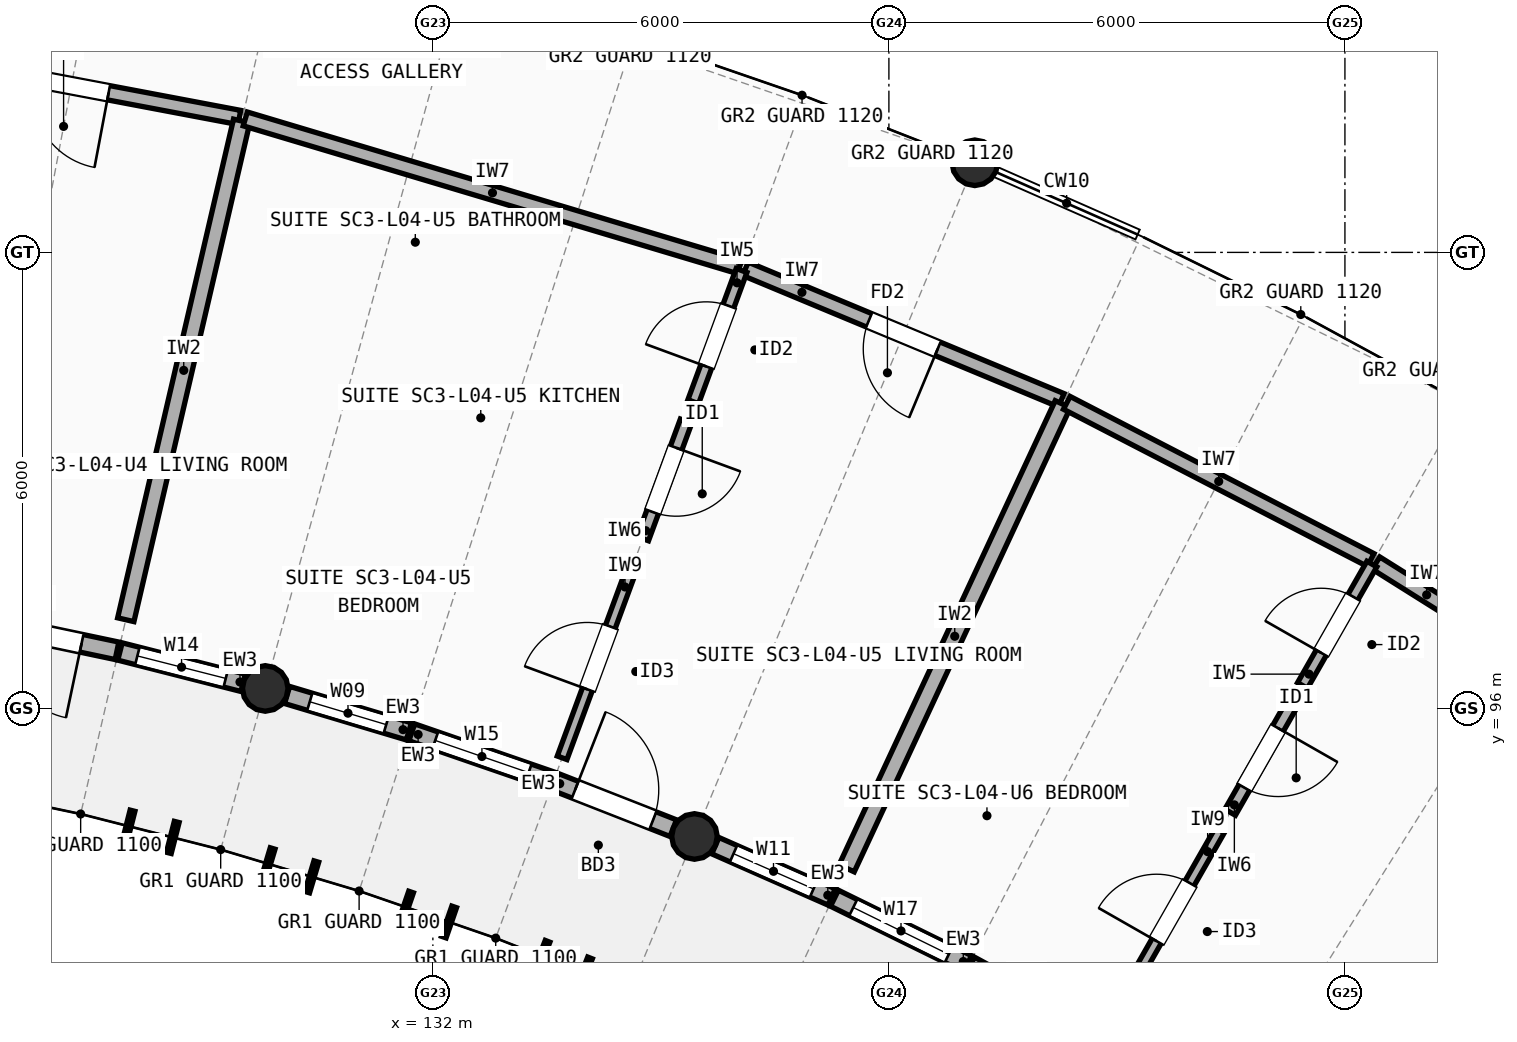
"""IFC4 building model, lengths in metres.
Left out: names, types, materials, properties, quantities, classifications, styles, units other than length and angle.
Written with IfcOpenShell. Run it as: python <this file> out.ifc"""

import sys

from ifc_helpers import new_model, si_unit, direction, frame, frame_2d, origin, origin_2d, place, context, subcontext, project, spatial, rectangle, circle, extrude, element, fill, save


model = new_model("IFC4")
c1 = context("Model", 3, precision=1e-05, world=origin(), true_north=direction((0.0, 1.0)))
c2 = subcontext(c1, "Body", "Model", "MODEL_VIEW")
j1 = project(units=[si_unit("LENGTHUNIT", "METRE"), si_unit("PLANEANGLEUNIT", "RADIAN")], contexts=[c1])
p1 = place(None, origin())
s1 = spatial("IfcSite", under=j1, at=p1, CompositionType="ELEMENT")
p2 = place(p1, origin())
s2 = spatial("IfcBuilding", under=s1, at=p2, CompositionType="ELEMENT")
p3 = place(p2, frame((0.0, 0.0, 14.1)))
s3 = spatial("IfcBuildingStorey", under=s2, at=p3, CompositionType="ELEMENT", Elevation=14.1)
for number, where, z_axis, x_axis in (
    (1, (129.795, 96.263, 0.0), (0.0, 0.0, 1.0), (1.0, 0.0, 0.0)),
    (2, (135.442, 94.316, 0.0), (0.0, 0.0, 1.0), (1.0, 0.0, 0.0)),
    (3, (139.13, 103.179, 0.0), (0.0, 0.0, 1.0), (1.0, 0.0, 0.0)),
):
    element("IfcColumn", number, at=place(p3, frame(where, z_axis=z_axis, x_axis=x_axis)), inside=s3, PredefinedType="COLUMN", context=c2, shape_type="SweptSolid", body=[
        extrude(circle(Radius=0.3, at=origin_2d()), origin(), (0.0, 0.0, 1.0), 2.948),
    ])
p4 = place(p3, frame((125.934, 97.161, 0.0), z_axis=(0.0, 0.0, 1.0), x_axis=(0.978533860292, -0.206086108851, 0.0)))
e4 = element("IfcWall", 4, at=p4, inside=s3, PredefinedType="STANDARD", context=c2, shape_type="SweptSolid", body=[
    extrude(rectangle(XDim=1.952, YDim=0.235, at=frame_2d((0.976, 0.0))), origin(), (0.0, 0.0, 1.0), 2.684),
])
p5 = place(p4, frame((0.476, 0.0, 0.0)))
e5 = element("IfcOpeningElement", 5, at=p5, cuts=e4, PredefinedType="OPENING", context=c2, shape_type="SweptSolid", body=[
    extrude(rectangle(XDim=1.0, YDim=2.15, at=frame_2d((0.5, 1.075))), frame((0.0, 0.127, 0.0), z_axis=(0.0, -1.0, 0.0), x_axis=(1.0, 0.0, 0.0)), (0.0, 0.0, 1.0), 0.255),
])
p6 = place(p3, frame((127.883, 96.75, 0.0), z_axis=(0.0, 0.0, 1.0), x_axis=(0.969120648535, -0.246587040581, 0.0)))
e6 = element("IfcWall", 6, at=p6, inside=s3, PredefinedType="STANDARD", context=c2, shape_type="SweptSolid", body=[
    extrude(rectangle(XDim=1.672, YDim=0.235, at=frame_2d((0.836, 0.0))), origin(), (0.0, 0.0, 1.0), 2.684),
])
p7 = place(p6, frame((0.236, 0.0, 0.85)))
e7 = element("IfcOpeningElement", 7, at=p7, cuts=e6, PredefinedType="OPENING", context=c2, shape_type="SweptSolid", body=[
    extrude(rectangle(XDim=1.2, YDim=1.5, at=frame_2d((0.6, 0.75))), frame((0.0, 0.127, 0.0), z_axis=(0.0, -1.0, 0.0), x_axis=(1.0, 0.0, 0.0)), (0.0, 0.0, 1.0), 0.255),
])
p8 = place(p3, frame((130.082, 96.177, 0.0), z_axis=(0.0, 0.0, 1.0), x_axis=(0.958063008465, -0.286557623894, 0.0)))
e8 = element("IfcWall", 8, at=p8, inside=s3, PredefinedType="STANDARD", context=c2, shape_type="SweptSolid", body=[
    extrude(rectangle(XDim=1.672, YDim=0.235, at=frame_2d((0.836, 0.0))), origin(), (0.0, 0.0, 1.0), 2.684),
])
p9 = place(p8, frame((0.311, 0.0, 0.85)))
e9 = element("IfcOpeningElement", 9, at=p9, cuts=e8, PredefinedType="OPENING", context=c2, shape_type="SweptSolid", body=[
    extrude(rectangle(XDim=1.05, YDim=1.35, at=frame_2d((0.525, 0.675))), frame((0.0, 0.127, 0.0), z_axis=(0.0, -1.0, 0.0), x_axis=(1.0, 0.0, 0.0)), (0.0, 0.0, 1.0), 0.255),
])
p10 = place(p3, frame((131.722, 95.686, 0.0), z_axis=(0.0, 0.0, 1.0), x_axis=(0.945368994877, -0.326002244662, 0.0)))
e10 = element("IfcWall", 10, at=p10, inside=s3, PredefinedType="STANDARD", context=c2, shape_type="SweptSolid", body=[
    extrude(rectangle(XDim=1.952, YDim=0.235, at=frame_2d((0.976, 0.0))), origin(), (0.0, 0.0, 1.0), 2.684),
])
p11 = place(p10, frame((0.326, 0.0, 0.85)))
e11 = element("IfcOpeningElement", 11, at=p11, cuts=e10, PredefinedType="OPENING", context=c2, shape_type="SweptSolid", body=[
    extrude(rectangle(XDim=1.3, YDim=1.45, at=frame_2d((0.65, 0.725))), frame((0.0, 0.127, 0.0), z_axis=(0.0, -1.0, 0.0), x_axis=(1.0, 0.0, 0.0)), (0.0, 0.0, 1.0), 0.255),
])
p12 = place(p3, frame((133.606, 95.036, 0.0), z_axis=(0.0, 0.0, 1.0), x_axis=(0.931012112308, -0.364988283012, 0.0)))
e12 = element("IfcWall", 12, at=p12, inside=s3, PredefinedType="STANDARD", context=c2, shape_type="SweptSolid", body=[
    extrude(rectangle(XDim=1.672, YDim=0.235, at=frame_2d((0.836, 0.0))), origin(), (0.0, 0.0, 1.0), 2.684),
])
p13 = place(p12, frame((0.286, 0.0, 0.0)))
e13 = element("IfcOpeningElement", 13, at=p13, cuts=e12, PredefinedType="OPENING", context=c2, shape_type="SweptSolid", body=[
    extrude(rectangle(XDim=1.1, YDim=2.15, at=frame_2d((0.55, 1.075))), frame((0.0, 0.127, 0.0), z_axis=(0.0, -1.0, 0.0), x_axis=(1.0, 0.0, 0.0)), (0.0, 0.0, 1.0), 0.255),
])
p14 = place(p3, frame((135.717, 94.195, 0.0), z_axis=(0.0, 0.0, 1.0), x_axis=(0.915095317091, -0.403237598246, 0.0)))
e14 = element("IfcWall", 14, at=p14, inside=s3, PredefinedType="STANDARD", context=c2, shape_type="SweptSolid", body=[
    extrude(rectangle(XDim=1.672, YDim=0.235, at=frame_2d((0.836, 0.0))), origin(), (0.0, 0.0, 1.0), 2.684),
])
p15 = place(p14, frame((0.261, 0.0, 0.85)))
e15 = element("IfcOpeningElement", 15, at=p15, cuts=e14, PredefinedType="OPENING", context=c2, shape_type="SweptSolid", body=[
    extrude(rectangle(XDim=1.15, YDim=1.45, at=frame_2d((0.575, 0.725))), frame((0.0, 0.127, 0.0), z_axis=(0.0, -1.0, 0.0), x_axis=(1.0, 0.0, 0.0)), (0.0, 0.0, 1.0), 0.255),
])
p16 = place(p3, frame((137.283, 93.503, 0.0), z_axis=(0.0, 0.0, 1.0), x_axis=(0.897531751182, -0.44094983345, 0.0)))
e16 = element("IfcWall", 16, at=p16, inside=s3, PredefinedType="STANDARD", context=c2, shape_type="SweptSolid", body=[
    extrude(rectangle(XDim=1.952, YDim=0.235, at=frame_2d((0.976, 0.0))), origin(), (0.0, 0.0, 1.0), 2.684),
])
p17 = place(p16, frame((0.276, 0.0, 0.85)))
e17 = element("IfcOpeningElement", 17, at=p17, cuts=e16, PredefinedType="OPENING", context=c2, shape_type="SweptSolid", body=[
    extrude(rectangle(XDim=1.4, YDim=1.5, at=frame_2d((0.7, 0.75))), frame((0.0, 0.127, 0.0), z_axis=(0.0, -1.0, 0.0), x_axis=(1.0, 0.0, 0.0)), (0.0, 0.0, 1.0), 0.255),
])
p18 = place(p3, frame((139.071, 92.624, 0.0), z_axis=(0.0, 0.0, 1.0), x_axis=(0.878447349235, -0.477839151412, 0.0)))
e18 = element("IfcWall", 18, at=p18, inside=s3, PredefinedType="STANDARD", context=c2, shape_type="SweptSolid", body=[
    extrude(rectangle(XDim=1.672, YDim=0.235, at=frame_2d((0.836, 0.0))), origin(), (0.0, 0.0, 1.0), 2.684),
])
p19 = place(p18, frame((0.236, 0.0, 0.85)))
e19 = element("IfcOpeningElement", 19, at=p19, cuts=e18, PredefinedType="OPENING", context=c2, shape_type="SweptSolid", body=[
    extrude(rectangle(XDim=1.2, YDim=1.45, at=frame_2d((0.6, 0.725))), frame((0.0, 0.127, 0.0), z_axis=(0.0, -1.0, 0.0), x_axis=(1.0, 0.0, 0.0)), (0.0, 0.0, 1.0), 0.255),
])
p20 = place(p3, frame((125.031, 104.611, 0.0), z_axis=(0.0, 0.0, 1.0), x_axis=(0.982595404078, -0.18575863879, 0.0)))
e20 = element("IfcWall", 20, at=p20, inside=s3, PredefinedType="SOLIDWALL", context=c2, shape_type="SweptSolid", body=[
    extrude(rectangle(XDim=4.501, YDim=0.19, at=frame_2d((2.251, 0.0))), origin(), (0.0, 0.0, 1.0), 2.742),
])
p21 = place(p20, frame((1.751, 0.0, 0.0)))
e21 = element("IfcOpeningElement", 21, at=p21, cuts=e20, PredefinedType="OPENING", context=c2, shape_type="SweptSolid", body=[
    extrude(rectangle(XDim=1.0, YDim=2.15, at=frame_2d((0.5, 1.075))), frame((0.0, 0.105, 0.0), z_axis=(0.0, -1.0, 0.0), x_axis=(1.0, 0.0, 0.0)), (0.0, 0.0, 1.0), 0.21),
])
p22 = place(p3, frame((127.96, 97.167, 0.0), z_axis=(0.0, 0.0, 1.0), x_axis=(0.226349561734, 0.974046136434, 0.0)))
e22 = element("IfcWall", 22, at=p22, inside=s3, PredefinedType="SOLIDWALL", context=c2, shape_type="SweptSolid", body=[
    extrude(rectangle(XDim=6.736, YDim=0.22, at=frame_2d((3.368, 0.0))), origin(), (0.0, 0.0, 1.0), 2.762),
])
p23 = place(p3, frame((129.532, 103.756, 0.0), z_axis=(0.0, 0.0, 1.0), x_axis=(0.958078275652, -0.286506575357, 0.0)))
e23 = element("IfcWall", 23, at=p23, inside=s3, PredefinedType="SOLIDWALL", context=c2, shape_type="SweptSolid", body=[
    extrude(rectangle(XDim=6.79, YDim=0.19, at=frame_2d((3.395, 0.0))), origin(), (0.0, 0.0, 1.0), 2.722),
])
p24 = place(p3, frame((136.112, 101.784, 0.0), z_axis=(0.0, 0.0, 1.0), x_axis=(0.923267760269, -0.384157054925, 0.0)))
e24 = element("IfcWall", 24, at=p24, inside=s3, PredefinedType="SOLIDWALL", context=c2, shape_type="SweptSolid", body=[
    extrude(rectangle(XDim=4.501, YDim=0.19, at=frame_2d((2.251, 0.0))), origin(), (0.0, 0.0, 1.0), 2.722),
])
p25 = place(p24, frame((1.761, 0.0, 0.0)))
e25 = element("IfcOpeningElement", 25, at=p25, cuts=e24, PredefinedType="OPENING", context=c2, shape_type="SweptSolid", body=[
    extrude(rectangle(XDim=0.98, YDim=2.15, at=frame_2d((0.49, 1.075))), frame((0.0, 0.105, 0.0), z_axis=(0.0, -1.0, 0.0), x_axis=(1.0, 0.0, 0.0)), (0.0, 0.0, 1.0), 0.21),
])
p26 = place(p3, frame((133.7, 95.351, 0.0), z_axis=(0.0, 0.0, 1.0), x_axis=(0.345555846023, 0.938398186954, 0.0)))
e26 = element("IfcWall", 26, at=p26, inside=s3, PredefinedType="PARTITIONING", context=c2, shape_type="SweptSolid", body=[
    extrude(rectangle(XDim=2.8, YDim=0.135, at=frame_2d((1.4, 0.0))), origin(), (0.0, 0.0, 1.0), 2.762),
])
p27 = place(p26, frame((0.96, 0.0, 0.0)))
e27 = element("IfcOpeningElement", 27, at=p27, cuts=e26, PredefinedType="OPENING", context=c2, shape_type="SweptSolid", body=[
    extrude(rectangle(XDim=0.88, YDim=2.1, at=frame_2d((0.44, 1.05))), frame((0.0, 0.077, 0.0), z_axis=(0.0, -1.0, 0.0), x_axis=(1.0, 0.0, 0.0)), (0.0, 0.0, 1.0), 0.155),
])
p28 = place(p3, frame((134.762, 98.233, 0.0), z_axis=(0.0, 0.0, 1.0), x_axis=(0.345581795697, 0.938388630836, 0.0)))
e28 = element("IfcWall", 28, at=p28, inside=s3, PredefinedType="PLUMBINGWALL", context=c2, shape_type="SweptSolid", body=[
    extrude(rectangle(XDim=1.648, YDim=0.16, at=frame_2d((0.824, 0.0))), origin(), (0.0, 0.0, 1.0), 2.762),
])
p29 = place(p28, frame((0.374, 0.0, 0.0)))
e29 = element("IfcOpeningElement", 29, at=p29, cuts=e28, PredefinedType="OPENING", context=c2, shape_type="SweptSolid", body=[
    extrude(rectangle(XDim=0.9, YDim=2.1, at=frame_2d((0.45, 1.05))), frame((0.0, 0.09, 0.0), z_axis=(0.0, -1.0, 0.0), x_axis=(1.0, 0.0, 0.0)), (0.0, 0.0, 1.0), 0.18),
])
p30 = place(p3, frame((135.426, 100.035, 0.0), z_axis=(0.0, 0.0, 1.0), x_axis=(0.345490154584, 0.938422374566, 0.0)))
e30 = element("IfcWall", 30, at=p30, inside=s3, PredefinedType="PARTITIONING", context=c2, shape_type="SweptSolid", body=[
    extrude(rectangle(XDim=1.84, YDim=0.15, at=frame_2d((0.92, 0.0))), origin(), (0.0, 0.0, 1.0), 2.762),
])
p31 = place(p30, frame((0.495, 0.0, 0.0)))
e31 = element("IfcOpeningElement", 31, at=p31, cuts=e30, PredefinedType="OPENING", context=c2, shape_type="SweptSolid", body=[
    extrude(rectangle(XDim=0.85, YDim=2.1, at=frame_2d((0.425, 1.05))), frame((0.0, 0.085, 0.0), z_axis=(0.0, -1.0, 0.0), x_axis=(1.0, 0.0, 0.0)), (0.0, 0.0, 1.0), 0.17),
])
p32 = place(p3, frame((137.444, 93.897, 0.0), z_axis=(0.0, 0.0, 1.0), x_axis=(0.422206763189, 0.906499558256, 0.0)))
e32 = element("IfcWall", 32, at=p32, inside=s3, PredefinedType="SOLIDWALL", context=c2, shape_type="SweptSolid", body=[
    extrude(rectangle(XDim=6.736, YDim=0.22, at=frame_2d((3.368, 0.0))), origin(), (0.0, 0.0, 1.0), 2.742),
])
p33 = place(p3, frame((140.34, 100.021, 0.0), z_axis=(0.0, 0.0, 1.0), x_axis=(0.888214590482, -0.459428820662, 0.0)))
e33 = element("IfcWall", 33, at=p33, inside=s3, PredefinedType="SOLIDWALL", context=c2, shape_type="SweptSolid", body=[
    extrude(rectangle(XDim=4.501, YDim=0.19, at=frame_2d((2.251, 0.0))), origin(), (0.0, 0.0, 1.0), 2.762),
])
p34 = place(p3, frame((144.408, 97.913, 0.0), z_axis=(0.0, 0.0, 1.0), x_axis=(0.847037081085, -0.531533802563, 0.0)))
e34 = element("IfcWall", 34, at=p34, inside=s3, PredefinedType="SOLIDWALL", context=c2, shape_type="SweptSolid", body=[
    extrude(rectangle(XDim=4.501, YDim=0.19, at=frame_2d((2.25, 0.0))), origin(), (0.0, 0.0, 1.0), 2.742),
])
p35 = place(p34, frame((1.726, 0.0, 0.0)))
e35 = element("IfcOpeningElement", 35, at=p35, cuts=e34, PredefinedType="OPENING", context=c2, shape_type="SweptSolid", body=[
    extrude(rectangle(XDim=1.05, YDim=2.15, at=frame_2d((0.525, 1.075))), frame((0.0, 0.105, 0.0), z_axis=(0.0, -1.0, 0.0), x_axis=(1.0, 0.0, 0.0)), (0.0, 0.0, 1.0), 0.21),
])
p36 = place(p3, frame((141.125, 92.245, 0.0), z_axis=(0.0, 0.0, 1.0), x_axis=(0.49594810138, 0.868352164008, 0.0)))
e36 = element("IfcWall", 36, at=p36, inside=s3, PredefinedType="PARTITIONING", context=c2, shape_type="SweptSolid", body=[
    extrude(rectangle(XDim=2.48, YDim=0.135, at=frame_2d((1.24, 0.0))), origin(), (0.0, 0.0, 1.0), 2.722),
])
p37 = place(p36, frame((0.8, 0.0, 0.0)))
e37 = element("IfcOpeningElement", 37, at=p37, cuts=e36, PredefinedType="OPENING", context=c2, shape_type="SweptSolid", body=[
    extrude(rectangle(XDim=0.88, YDim=2.1, at=frame_2d((0.44, 1.05))), frame((0.0, 0.077, 0.0), z_axis=(0.0, -1.0, 0.0), x_axis=(1.0, 0.0, 0.0)), (0.0, 0.0, 1.0), 0.155),
])
p38 = place(p3, frame((142.49, 94.635, 0.0), z_axis=(0.0, 0.0, 1.0), x_axis=(0.49583578404, 0.868416302971, 0.0)))
e38 = element("IfcWall", 38, at=p38, inside=s3, PredefinedType="PLUMBINGWALL", context=c2, shape_type="SweptSolid", body=[
    extrude(rectangle(XDim=1.648, YDim=0.16, at=frame_2d((0.824, 0.0))), origin(), (0.0, 0.0, 1.0), 2.722),
])
p39 = place(p38, frame((0.374, 0.0, 0.0)))
e39 = element("IfcOpeningElement", 39, at=p39, cuts=e38, PredefinedType="OPENING", context=c2, shape_type="SweptSolid", body=[
    extrude(rectangle(XDim=0.9, YDim=2.1, at=frame_2d((0.45, 1.05))), frame((0.0, 0.09, 0.0), z_axis=(0.0, -1.0, 0.0), x_axis=(1.0, 0.0, 0.0)), (0.0, 0.0, 1.0), 0.18),
])
p40 = place(p3, frame((143.442, 96.302, 0.0), z_axis=(0.0, 0.0, 1.0), x_axis=(0.495938892217, 0.868357423638, 0.0)))
e40 = element("IfcWall", 40, at=p40, inside=s3, PredefinedType="PARTITIONING", context=c2, shape_type="SweptSolid", body=[
    extrude(rectangle(XDim=1.84, YDim=0.15, at=frame_2d((0.92, 0.0))), origin(), (0.0, 0.0, 1.0), 2.722),
])
p41 = place(p40, frame((0.495, 0.0, 0.0)))
e41 = element("IfcOpeningElement", 41, at=p41, cuts=e40, PredefinedType="OPENING", context=c2, shape_type="SweptSolid", body=[
    extrude(rectangle(XDim=0.85, YDim=2.1, at=frame_2d((0.425, 1.05))), frame((0.0, 0.085, 0.0), z_axis=(0.0, -1.0, 0.0), x_axis=(1.0, 0.0, 0.0)), (0.0, 0.0, 1.0), 0.17),
])
p42 = place(p5, frame((1.0, 0.0, 0.0), z_axis=(0.0, 0.0, 1.0), x_axis=(-1.0, 0.0, 0.0)))
e42 = element("IfcDoor", 42, at=p42, inside=s3, OperationType="SINGLE_SWING_RIGHT", PredefinedType="DOOR", context=c2, shape_type="SweptSolid", body=[
    extrude(rectangle(XDim=1.0, YDim=2.15, at=frame_2d((0.5, 1.075))), frame((0.0, 0.025, 0.0), z_axis=(0.0, -1.0, 0.0), x_axis=(1.0, 0.0, 0.0)), (0.0, 0.0, 1.0), 0.05),
])
fill(e5, e42)
p43 = place(p7, origin())
e43 = element("IfcWindow", 43, at=p43, inside=s3, PartitioningType="SINGLE_PANEL", PredefinedType="WINDOW", context=c2, shape_type="SweptSolid", body=[
    extrude(rectangle(XDim=1.2, YDim=1.5, at=frame_2d((0.6, 0.75))), frame((0.0, 0.03, 0.0), z_axis=(0.0, -1.0, 0.0), x_axis=(1.0, 0.0, 0.0)), (0.0, 0.0, 1.0), 0.06),
])
fill(e7, e43)
p44 = place(p9, origin())
e44 = element("IfcWindow", 44, at=p44, inside=s3, PartitioningType="SINGLE_PANEL", PredefinedType="WINDOW", context=c2, shape_type="SweptSolid", body=[
    extrude(rectangle(XDim=1.05, YDim=1.35, at=frame_2d((0.525, 0.675))), frame((0.0, 0.03, 0.0), z_axis=(0.0, -1.0, 0.0), x_axis=(1.0, 0.0, 0.0)), (0.0, 0.0, 1.0), 0.06),
])
fill(e9, e44)
p45 = place(p11, origin())
e45 = element("IfcWindow", 45, at=p45, inside=s3, PartitioningType="SINGLE_PANEL", PredefinedType="WINDOW", context=c2, shape_type="SweptSolid", body=[
    extrude(rectangle(XDim=1.3, YDim=1.45, at=frame_2d((0.65, 0.725))), frame((0.0, 0.03, 0.0), z_axis=(0.0, -1.0, 0.0), x_axis=(1.0, 0.0, 0.0)), (0.0, 0.0, 1.0), 0.06),
])
fill(e11, e45)
p46 = place(p13, frame((1.1, 0.0, 0.0), z_axis=(0.0, 0.0, 1.0), x_axis=(-1.0, 0.0, 0.0)))
e46 = element("IfcDoor", 46, at=p46, inside=s3, OperationType="SINGLE_SWING_LEFT", PredefinedType="DOOR", context=c2, shape_type="SweptSolid", body=[
    extrude(rectangle(XDim=1.1, YDim=2.15, at=frame_2d((0.55, 1.075))), frame((0.0, 0.025, 0.0), z_axis=(0.0, -1.0, 0.0), x_axis=(1.0, 0.0, 0.0)), (0.0, 0.0, 1.0), 0.05),
])
fill(e13, e46)
p47 = place(p15, origin())
e47 = element("IfcWindow", 47, at=p47, inside=s3, PartitioningType="SINGLE_PANEL", PredefinedType="WINDOW", context=c2, shape_type="SweptSolid", body=[
    extrude(rectangle(XDim=1.15, YDim=1.45, at=frame_2d((0.575, 0.725))), frame((0.0, 0.03, 0.0), z_axis=(0.0, -1.0, 0.0), x_axis=(1.0, 0.0, 0.0)), (0.0, 0.0, 1.0), 0.06),
])
fill(e15, e47)
p48 = place(p17, origin())
e48 = element("IfcWindow", 48, at=p48, inside=s3, PartitioningType="SINGLE_PANEL", PredefinedType="WINDOW", context=c2, shape_type="SweptSolid", body=[
    extrude(rectangle(XDim=1.4, YDim=1.5, at=frame_2d((0.7, 0.75))), frame((0.0, 0.03, 0.0), z_axis=(0.0, -1.0, 0.0), x_axis=(1.0, 0.0, 0.0)), (0.0, 0.0, 1.0), 0.06),
])
fill(e17, e48)
p49 = place(p21, origin())
e49 = element("IfcDoor", 49, at=p49, inside=s3, OperationType="SINGLE_SWING_RIGHT", PredefinedType="DOOR", context=c2, shape_type="SweptSolid", body=[
    extrude(rectangle(XDim=1.0, YDim=2.15, at=frame_2d((0.5, 1.075))), frame((0.0, 0.025, 0.0), z_axis=(0.0, -1.0, 0.0), x_axis=(1.0, 0.0, 0.0)), (0.0, 0.0, 1.0), 0.05),
])
fill(e21, e49)
p50 = place(p25, origin())
e50 = element("IfcDoor", 50, at=p50, inside=s3, OperationType="SINGLE_SWING_RIGHT", PredefinedType="DOOR", context=c2, shape_type="SweptSolid", body=[
    extrude(rectangle(XDim=0.98, YDim=2.15, at=frame_2d((0.49, 1.075))), frame((0.0, 0.025, 0.0), z_axis=(0.0, -1.0, 0.0), x_axis=(1.0, 0.0, 0.0)), (0.0, 0.0, 1.0), 0.05),
])
fill(e25, e50)
p51 = place(p27, origin())
e51 = element("IfcDoor", 51, at=p51, inside=s3, OperationType="SINGLE_SWING_LEFT", PredefinedType="DOOR", context=c2, shape_type="SweptSolid", body=[
    extrude(rectangle(XDim=0.88, YDim=2.1, at=frame_2d((0.44, 1.05))), frame((0.0, 0.025, 0.0), z_axis=(0.0, -1.0, 0.0), x_axis=(1.0, 0.0, 0.0)), (0.0, 0.0, 1.0), 0.05),
])
fill(e27, e51)
p52 = place(p29, origin())
e52 = element("IfcDoor", 52, at=p52, inside=s3, OperationType="SINGLE_SWING_RIGHT", PredefinedType="DOOR", context=c2, shape_type="SweptSolid", body=[
    extrude(rectangle(XDim=0.9, YDim=2.1, at=frame_2d((0.45, 1.05))), frame((0.0, 0.025, 0.0), z_axis=(0.0, -1.0, 0.0), x_axis=(1.0, 0.0, 0.0)), (0.0, 0.0, 1.0), 0.05),
])
fill(e29, e52)
p53 = place(p31, origin())
e53 = element("IfcDoor", 53, at=p53, inside=s3, OperationType="SINGLE_SWING_LEFT", PredefinedType="DOOR", context=c2, shape_type="SweptSolid", body=[
    extrude(rectangle(XDim=0.85, YDim=2.1, at=frame_2d((0.425, 1.05))), frame((0.0, 0.025, 0.0), z_axis=(0.0, -1.0, 0.0), x_axis=(1.0, 0.0, 0.0)), (0.0, 0.0, 1.0), 0.05),
])
fill(e31, e53)
p54 = place(p37, origin())
e54 = element("IfcDoor", 54, at=p54, inside=s3, OperationType="SINGLE_SWING_LEFT", PredefinedType="DOOR", context=c2, shape_type="SweptSolid", body=[
    extrude(rectangle(XDim=0.88, YDim=2.1, at=frame_2d((0.44, 1.05))), frame((0.0, 0.025, 0.0), z_axis=(0.0, -1.0, 0.0), x_axis=(1.0, 0.0, 0.0)), (0.0, 0.0, 1.0), 0.05),
])
fill(e37, e54)
p55 = place(p39, origin())
e55 = element("IfcDoor", 55, at=p55, inside=s3, OperationType="SINGLE_SWING_RIGHT", PredefinedType="DOOR", context=c2, shape_type="SweptSolid", body=[
    extrude(rectangle(XDim=0.9, YDim=2.1, at=frame_2d((0.45, 1.05))), frame((0.0, 0.025, 0.0), z_axis=(0.0, -1.0, 0.0), x_axis=(1.0, 0.0, 0.0)), (0.0, 0.0, 1.0), 0.05),
])
fill(e39, e55)
p56 = place(p41, origin())
e56 = element("IfcDoor", 56, at=p56, inside=s3, OperationType="SINGLE_SWING_LEFT", PredefinedType="DOOR", context=c2, shape_type="SweptSolid", body=[
    extrude(rectangle(XDim=0.85, YDim=2.1, at=frame_2d((0.425, 1.05))), frame((0.0, 0.025, 0.0), z_axis=(0.0, -1.0, 0.0), x_axis=(1.0, 0.0, 0.0)), (0.0, 0.0, 1.0), 0.05),
])
fill(e41, e56)
save(model, sys.argv[1])
